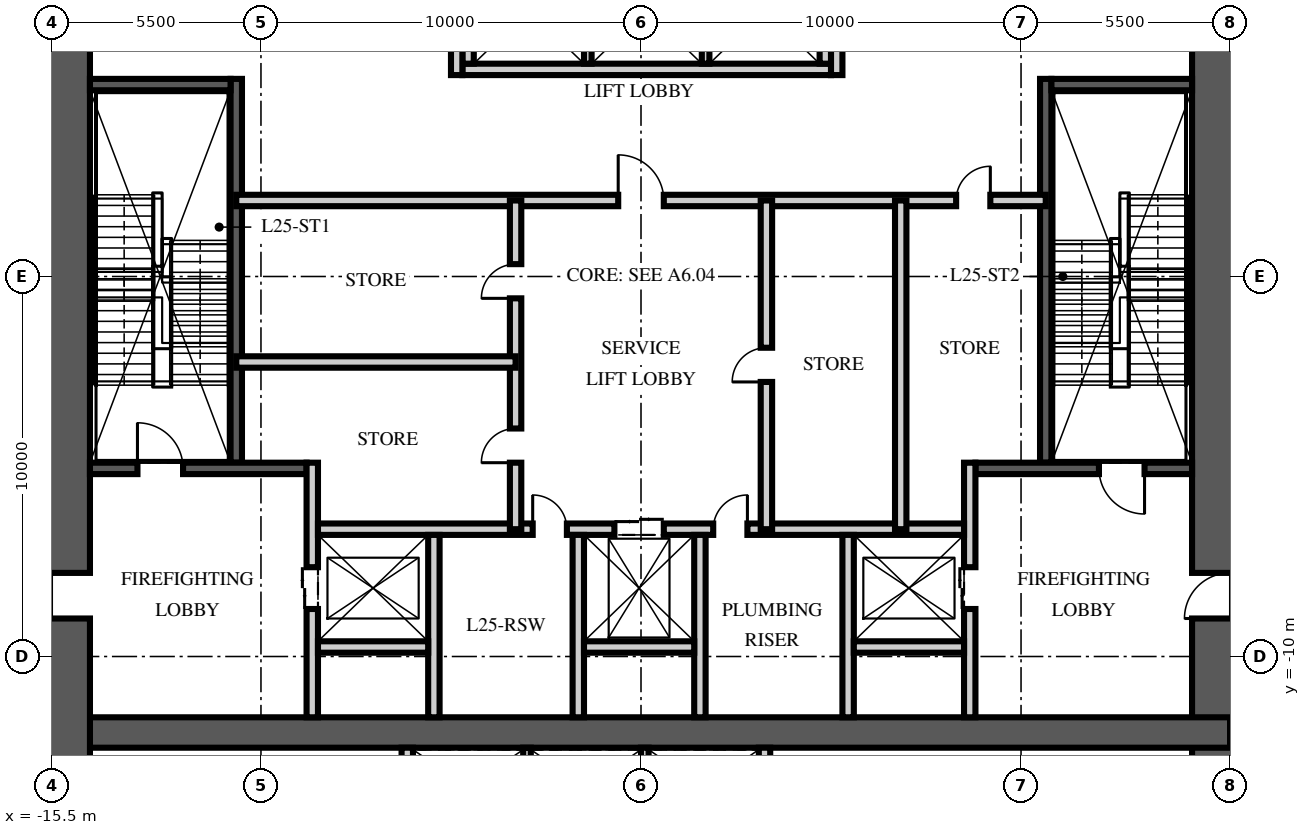
"""IFC4 building model, lengths in metres.
Left out: names, types, materials, properties, quantities, classifications, styles, units other than length and angle.
Written with IfcOpenShell. Run it as: python <this file> out.ifc"""

import sys

from ifc_helpers import new_model, si_unit, direction, frame, frame_2d, origin, place, context, subcontext, project, spatial, rectangle, extrude, element, fill, save


model = new_model("IFC4")
c1 = context("Model", 3, precision=1e-05, world=origin(), true_north=direction((0.0, 1.0)))
c2 = subcontext(c1, "Body", "Model", "MODEL_VIEW")
j1 = project(units=[si_unit("LENGTHUNIT", "METRE"), si_unit("PLANEANGLEUNIT", "RADIAN")], contexts=[c1])
p1 = place(None, origin())
s1 = spatial("IfcSite", under=j1, at=p1, CompositionType="ELEMENT")
p2 = place(p1, origin())
s2 = spatial("IfcBuilding", under=s1, at=p2, CompositionType="ELEMENT")
p3 = place(p2, frame((0.0, 0.0, 99.75)))
s3 = spatial("IfcBuildingStorey", under=s2, at=p3, CompositionType="ELEMENT", Elevation=99.75)
p4 = place(p3, frame((15.5, -15.5, -0.35), z_axis=(0.0, 0.0, 1.0), x_axis=(0.0, 1.0, 0.0)))
e1 = element("IfcWall", 1, at=p4, inside=s3, PredefinedType="SHEAR", context=c2, shape_type="SweptSolid", body=[
    extrude(rectangle(XDim=31.0, YDim=2.0, at=frame_2d((15.5, 0.0))), origin(), (0.0, 0.0, 1.0), 7.6),
])
p5 = place(p4, frame((6.5, 0.0, 0.35)))
e2 = element("IfcOpeningElement", 2, at=p5, cuts=e1, PredefinedType="OPENING", context=c2, shape_type="SweptSolid", body=[
    extrude(rectangle(XDim=1.2, YDim=2.1, at=frame_2d((0.6, 1.05))), frame((0.0, 1.01, 0.0), z_axis=(0.0, -1.0, 0.0), x_axis=(1.0, 0.0, 0.0)), (0.0, 0.0, 1.0), 2.02),
])
p6 = place(p4, frame((22.7, 0.0, 0.35)))
e3 = element("IfcOpeningElement", 3, at=p6, cuts=e1, PredefinedType="OPENING", context=c2, shape_type="SweptSolid", body=[
    extrude(rectangle(XDim=1.8, YDim=2.1, at=frame_2d((0.9, 1.05))), frame((0.0, 1.01, 0.0), z_axis=(0.0, -1.0, 0.0), x_axis=(1.0, 0.0, 0.0)), (0.0, 0.0, 1.0), 2.02),
])
p7 = place(p3, frame((-15.5, -12.0, -0.35), z_axis=(0.0, 0.0, 1.0), x_axis=(1.0, 0.0, 0.0)))
e4 = element("IfcWall", 4, at=p7, inside=s3, PredefinedType="SHEAR", context=c2, shape_type="SweptSolid", body=[
    extrude(rectangle(XDim=31.0, YDim=0.8, at=frame_2d((15.5, 0.0))), origin(), (0.0, 0.0, 1.0), 7.6),
])
p8 = place(p3, frame((-15.5, -15.5, -0.35), z_axis=(0.0, 0.0, 1.0), x_axis=(0.0, 1.0, 0.0)))
e5 = element("IfcWall", 5, at=p8, inside=s3, PredefinedType="SHEAR", context=c2, shape_type="SweptSolid", body=[
    extrude(rectangle(XDim=31.0, YDim=2.0, at=frame_2d((15.5, 0.0))), origin(), (0.0, 0.0, 1.0), 7.6),
])
p9 = place(p8, frame((6.5, 0.0, 0.35)))
e6 = element("IfcOpeningElement", 6, at=p9, cuts=e5, PredefinedType="OPENING", context=c2, shape_type="SweptSolid", body=[
    extrude(rectangle(XDim=1.2, YDim=2.1, at=frame_2d((0.6, 1.05))), frame((0.0, 1.01, 0.0), z_axis=(0.0, -1.0, 0.0), x_axis=(1.0, 0.0, 0.0)), (0.0, 0.0, 1.0), 2.02),
])
p10 = place(p8, frame((22.7, 0.0, 0.35)))
e7 = element("IfcOpeningElement", 7, at=p10, cuts=e5, PredefinedType="OPENING", context=c2, shape_type="SweptSolid", body=[
    extrude(rectangle(XDim=1.8, YDim=2.1, at=frame_2d((0.9, 1.05))), frame((0.0, 1.01, 0.0), z_axis=(0.0, -1.0, 0.0), x_axis=(1.0, 0.0, 0.0)), (0.0, 0.0, 1.0), 2.02),
])
p11 = place(p3, frame((-10.65, -4.9, 0.0), z_axis=(0.0, 0.0, 1.0), x_axis=(0.0, 1.0, 0.0)))
e8 = element("IfcWall", 8, at=p11, inside=s3, PredefinedType="SOLIDWALL", context=c2, shape_type="SweptSolid", body=[
    extrude(rectangle(XDim=10.1, YDim=0.3, at=frame_2d((5.05, 0.0))), origin(), (0.0, 0.0, 1.0), 7.25),
])
p12 = place(p3, frame((-14.5, -5.05, 0.0), z_axis=(0.0, 0.0, 1.0), x_axis=(1.0, 0.0, 0.0)))
e9 = element("IfcWall", 9, at=p12, inside=s3, PredefinedType="SOLIDWALL", context=c2, shape_type="SweptSolid", body=[
    extrude(rectangle(XDim=5.7, YDim=0.3, at=frame_2d((2.85, 0.0))), origin(), (0.0, 0.0, 1.0), 7.25),
])
p13 = place(p12, frame((1.25, 0.0, 0.0)))
e10 = element("IfcOpeningElement", 10, at=p13, cuts=e9, PredefinedType="OPENING", context=c2, shape_type="SweptSolid", body=[
    extrude(rectangle(XDim=1.2, YDim=2.1, at=frame_2d((0.6, 1.05))), frame((0.0, 0.16, 0.0), z_axis=(0.0, -1.0, 0.0), x_axis=(1.0, 0.0, 0.0)), (0.0, 0.0, 1.0), 0.32),
])
p14 = place(p3, frame((-14.5, 5.05, 0.0), z_axis=(0.0, 0.0, 1.0), x_axis=(1.0, 0.0, 0.0)))
e11 = element("IfcWall", 11, at=p14, inside=s3, PredefinedType="SOLIDWALL", context=c2, shape_type="SweptSolid", body=[
    extrude(rectangle(XDim=3.7, YDim=0.3, at=frame_2d((1.85, 0.0))), origin(), (0.0, 0.0, 1.0), 7.25),
])
p15 = place(p3, frame((-8.65, -11.6, 0.0), z_axis=(0.0, 0.0, 1.0), x_axis=(0.0, 1.0, 0.0)))
e12 = element("IfcWall", 12, at=p15, inside=s3, PredefinedType="PARTITIONING", context=c2, shape_type="SweptSolid", body=[
    extrude(rectangle(XDim=6.7, YDim=0.3, at=frame_2d((3.35, 0.0))), origin(), (0.0, 0.0, 1.0), 7.25),
])
p16 = place(p15, frame((2.85, 0.0, 0.0)))
e13 = element("IfcOpeningElement", 13, at=p16, cuts=e12, PredefinedType="OPENING", context=c2, shape_type="SweptSolid", body=[
    extrude(rectangle(XDim=1.1, YDim=2.1, at=frame_2d((0.55, 1.05))), frame((0.0, 0.16, 0.0), z_axis=(0.0, -1.0, 0.0), x_axis=(1.0, 0.0, 0.0)), (0.0, 0.0, 1.0), 0.32),
])
p17 = place(p3, frame((10.65, -4.9, 0.0), z_axis=(0.0, 0.0, 1.0), x_axis=(0.0, 1.0, 0.0)))
e14 = element("IfcWall", 14, at=p17, inside=s3, PredefinedType="SOLIDWALL", context=c2, shape_type="SweptSolid", body=[
    extrude(rectangle(XDim=10.1, YDim=0.3, at=frame_2d((5.05, 0.0))), origin(), (0.0, 0.0, 1.0), 7.25),
])
p18 = place(p3, frame((14.5, -5.05, 0.0), z_axis=(0.0, 0.0, 1.0), x_axis=(-1.0, 0.0, 0.0)))
e15 = element("IfcWall", 15, at=p18, inside=s3, PredefinedType="SOLIDWALL", context=c2, shape_type="SweptSolid", body=[
    extrude(rectangle(XDim=5.7, YDim=0.3, at=frame_2d((2.85, 0.0))), origin(), (0.0, 0.0, 1.0), 7.25),
])
p19 = place(p18, frame((1.25, 0.0, 0.0)))
e16 = element("IfcOpeningElement", 16, at=p19, cuts=e15, PredefinedType="OPENING", context=c2, shape_type="SweptSolid", body=[
    extrude(rectangle(XDim=1.2, YDim=2.1, at=frame_2d((0.6, 1.05))), frame((0.0, 0.16, 0.0), z_axis=(0.0, -1.0, 0.0), x_axis=(1.0, 0.0, 0.0)), (0.0, 0.0, 1.0), 0.32),
])
p20 = place(p3, frame((14.5, 5.05, 0.0), z_axis=(0.0, 0.0, 1.0), x_axis=(-1.0, 0.0, 0.0)))
e17 = element("IfcWall", 17, at=p20, inside=s3, PredefinedType="SOLIDWALL", context=c2, shape_type="SweptSolid", body=[
    extrude(rectangle(XDim=3.7, YDim=0.3, at=frame_2d((1.85, 0.0))), origin(), (0.0, 0.0, 1.0), 7.25),
])
p21 = place(p3, frame((8.65, -11.6, 0.0), z_axis=(0.0, 0.0, 1.0), x_axis=(0.0, 1.0, 0.0)))
e18 = element("IfcWall", 18, at=p21, inside=s3, PredefinedType="PARTITIONING", context=c2, shape_type="SweptSolid", body=[
    extrude(rectangle(XDim=6.7, YDim=0.3, at=frame_2d((3.35, 0.0))), origin(), (0.0, 0.0, 1.0), 7.25),
])
p22 = place(p21, frame((2.85, 0.0, 0.0)))
e19 = element("IfcOpeningElement", 19, at=p22, cuts=e18, PredefinedType="OPENING", context=c2, shape_type="SweptSolid", body=[
    extrude(rectangle(XDim=1.1, YDim=2.1, at=frame_2d((0.55, 1.05))), frame((0.0, 0.16, 0.0), z_axis=(0.0, -1.0, 0.0), x_axis=(1.0, 0.0, 0.0)), (0.0, 0.0, 1.0), 0.32),
])
p23 = place(p3, frame((-8.5, -6.65, 0.0), z_axis=(0.0, 0.0, 1.0), x_axis=(1.0, 0.0, 0.0)))
e20 = element("IfcWall", 20, at=p23, inside=s3, PredefinedType="PARTITIONING", context=c2, shape_type="SweptSolid", body=[
    extrude(rectangle(XDim=17.0, YDim=0.3, at=frame_2d((8.5, 0.0))), origin(), (0.0, 0.0, 1.0), 7.25),
])
p24 = place(p23, frame((7.8, 0.0, 0.0)))
e21 = element("IfcOpeningElement", 21, at=p24, cuts=e20, PredefinedType="OPENING", context=c2, shape_type="SweptSolid", body=[
    extrude(rectangle(XDim=1.3, YDim=2.4, at=frame_2d((0.65, 1.2))), frame((0.0, 0.16, 0.0), z_axis=(0.0, -1.0, 0.0), x_axis=(1.0, 0.0, 0.0)), (0.0, 0.0, 1.0), 0.32),
])
p25 = place(p23, frame((5.65, 0.0, 0.0)))
e22 = element("IfcOpeningElement", 22, at=p25, cuts=e20, PredefinedType="OPENING", context=c2, shape_type="SweptSolid", body=[
    extrude(rectangle(XDim=0.9, YDim=2.1, at=frame_2d((0.45, 1.05))), frame((0.0, 0.16, 0.0), z_axis=(0.0, -1.0, 0.0), x_axis=(1.0, 0.0, 0.0)), (0.0, 0.0, 1.0), 0.32),
])
p26 = place(p23, frame((10.4, 0.0, 0.0)))
e23 = element("IfcOpeningElement", 23, at=p26, cuts=e20, PredefinedType="OPENING", context=c2, shape_type="SweptSolid", body=[
    extrude(rectangle(XDim=0.9, YDim=2.1, at=frame_2d((0.45, 1.05))), frame((0.0, 0.16, 0.0), z_axis=(0.0, -1.0, 0.0), x_axis=(1.0, 0.0, 0.0)), (0.0, 0.0, 1.0), 0.32),
])
for number, where, z_axis, x_axis in (
    (24, (-5.45, -11.6, 0.0), (0.0, 0.0, 1.0), (0.0, 1.0, 0.0)),
    (25, (-1.65, -11.6, 0.0), (0.0, 0.0, 1.0), (0.0, 1.0, 0.0)),
    (26, (1.55, -11.6, 0.0), (0.0, 0.0, 1.0), (0.0, 1.0, 0.0)),
    (27, (5.45, -11.6, 0.0), (0.0, 0.0, 1.0), (0.0, 1.0, 0.0)),
):
    element("IfcWall", number, at=place(p3, frame(where, z_axis=z_axis, x_axis=x_axis)), inside=s3, PredefinedType="PARTITIONING", context=c2, shape_type="SweptSolid", body=[
        extrude(rectangle(XDim=4.8, YDim=0.3, at=frame_2d((2.4, 0.0))), origin(), (0.0, 0.0, 1.0), 7.25),
    ])
for number, where, z_axis, x_axis in (
    (28, (-8.5, -9.75, 0.0), (0.0, 0.0, 1.0), (1.0, 0.0, 0.0)),
    (29, (-1.5, -9.75, 0.0), (0.0, 0.0, 1.0), (1.0, 0.0, 0.0)),
    (30, (5.6, -9.75, 0.0), (0.0, 0.0, 1.0), (1.0, 0.0, 0.0)),
):
    element("IfcWall", number, at=place(p3, frame(where, z_axis=z_axis, x_axis=x_axis)), inside=s3, PredefinedType="PARTITIONING", context=c2, shape_type="SweptSolid", body=[
        extrude(rectangle(XDim=2.9, YDim=0.3, at=frame_2d((1.45, 0.0))), origin(), (0.0, 0.0, 1.0), 7.25),
    ])
p27 = place(p3, frame((-4.7, 5.45, 0.0), z_axis=(0.0, 0.0, 1.0), x_axis=(1.0, 0.0, 0.0)))
e31 = element("IfcWall", 31, at=p27, inside=s3, PredefinedType="PARTITIONING", context=c2, shape_type="SweptSolid", body=[
    extrude(rectangle(XDim=9.7, YDim=0.3, at=frame_2d((4.85, 0.0))), origin(), (0.0, 0.0, 1.0), 7.25),
])
for number, where, z_axis, x_axis in (
    (32, (-4.55, 5.6, 0.0), (0.0, 0.0, 1.0), (0.0, 1.0, 0.0)),
    (33, (4.85, 5.6, 0.0), (0.0, 0.0, 1.0), (0.0, 1.0, 0.0)),
):
    element("IfcWall", number, at=place(p3, frame(where, z_axis=z_axis, x_axis=x_axis)), inside=s3, PredefinedType="PARTITIONING", context=c2, shape_type="SweptSolid", body=[
        extrude(rectangle(XDim=2.8, YDim=0.3, at=frame_2d((1.4, 0.0))), origin(), (0.0, 0.0, 1.0), 7.25),
    ])
for number, where, z_axis, x_axis in (
    (34, (-1.4, 5.6, 0.0), (0.0, 0.0, 1.0), (0.0, 1.0, 0.0)),
    (35, (1.7, 5.6, 0.0), (0.0, 0.0, 1.0), (0.0, 1.0, 0.0)),
):
    element("IfcWall", number, at=place(p3, frame(where, z_axis=z_axis, x_axis=x_axis)), inside=s3, PredefinedType="PARTITIONING", context=c2, shape_type="SweptSolid", body=[
        extrude(rectangle(XDim=2.8, YDim=0.2, at=frame_2d((1.4, 0.0))), origin(), (0.0, 0.0, 1.0), 7.25),
    ])
for number, where, z_axis, x_axis in (
    (36, (-6.15, -14.5, 0.0), (0.0, 0.0, 1.0), (0.0, 1.0, 0.0)),
    (37, (3.25, -14.5, 0.0), (0.0, 0.0, 1.0), (0.0, 1.0, 0.0)),
):
    element("IfcWall", number, at=place(p3, frame(where, z_axis=z_axis, x_axis=x_axis)), inside=s3, PredefinedType="PARTITIONING", context=c2, shape_type="SweptSolid", body=[
        extrude(rectangle(XDim=2.1, YDim=0.3, at=frame_2d((1.05, 0.0))), origin(), (0.0, 0.0, 1.0), 7.25),
    ])
for number, where, z_axis, x_axis in (
    (38, (-3.0, -14.5, 0.0), (0.0, 0.0, 1.0), (0.0, 1.0, 0.0)),
    (39, (0.1, -14.5, 0.0), (0.0, 0.0, 1.0), (0.0, 1.0, 0.0)),
):
    element("IfcWall", number, at=place(p3, frame(where, z_axis=z_axis, x_axis=x_axis)), inside=s3, PredefinedType="PARTITIONING", context=c2, shape_type="SweptSolid", body=[
        extrude(rectangle(XDim=2.1, YDim=0.2, at=frame_2d((1.05, 0.0))), origin(), (0.0, 0.0, 1.0), 7.25),
    ])
p28 = place(p3, frame((-10.65, 2.0, 0.0), z_axis=(0.0, 0.0, 1.0), x_axis=(1.0, 0.0, 0.0)))
e40 = element("IfcWall", 40, at=p28, inside=s3, PredefinedType="PARTITIONING", context=c2, shape_type="SweptSolid", body=[
    extrude(rectangle(XDim=21.3, YDim=0.3, at=frame_2d((10.65, 0.0))), origin(), (0.0, 0.0, 1.0), 7.25),
])
p29 = place(p28, frame((10.05, 0.0, 0.0)))
e41 = element("IfcOpeningElement", 41, at=p29, cuts=e40, PredefinedType="OPENING", context=c2, shape_type="SweptSolid", body=[
    extrude(rectangle(XDim=1.2, YDim=2.1, at=frame_2d((0.6, 1.05))), frame((0.0, 0.16, 0.0), z_axis=(0.0, -1.0, 0.0), x_axis=(1.0, 0.0, 0.0)), (0.0, 0.0, 1.0), 0.32),
])
p30 = place(p28, frame((18.942, 0.0, 0.0)))
e42 = element("IfcOpeningElement", 42, at=p30, cuts=e40, PredefinedType="OPENING", context=c2, shape_type="SweptSolid", body=[
    extrude(rectangle(XDim=0.9, YDim=2.1, at=frame_2d((0.45, 1.05))), frame((0.0, 0.16, 0.0), z_axis=(0.0, -1.0, 0.0), x_axis=(1.0, 0.0, 0.0)), (0.0, 0.0, 1.0), 0.32),
])
p31 = place(p3, frame((-3.3, -6.65, 0.0), z_axis=(0.0, 0.0, 1.0), x_axis=(0.0, 1.0, 0.0)))
e43 = element("IfcWall", 43, at=p31, inside=s3, PredefinedType="PARTITIONING", context=c2, shape_type="SweptSolid", body=[
    extrude(rectangle(XDim=8.65, YDim=0.3, at=frame_2d((4.325, 0.0))), origin(), (0.0, 0.0, 1.0), 7.25),
])
p32 = place(p31, frame((1.75, 0.0, 0.0)))
e44 = element("IfcOpeningElement", 44, at=p32, cuts=e43, PredefinedType="OPENING", context=c2, shape_type="SweptSolid", body=[
    extrude(rectangle(XDim=0.9, YDim=2.1, at=frame_2d((0.45, 1.05))), frame((0.0, 0.16, 0.0), z_axis=(0.0, -1.0, 0.0), x_axis=(1.0, 0.0, 0.0)), (0.0, 0.0, 1.0), 0.32),
])
p33 = place(p31, frame((6.075, 0.0, 0.0)))
e45 = element("IfcOpeningElement", 45, at=p33, cuts=e43, PredefinedType="OPENING", context=c2, shape_type="SweptSolid", body=[
    extrude(rectangle(XDim=0.9, YDim=2.1, at=frame_2d((0.45, 1.05))), frame((0.0, 0.16, 0.0), z_axis=(0.0, -1.0, 0.0), x_axis=(1.0, 0.0, 0.0)), (0.0, 0.0, 1.0), 0.32),
])
p34 = place(p3, frame((3.3, -6.65, 0.0), z_axis=(0.0, 0.0, 1.0), x_axis=(0.0, 1.0, 0.0)))
e46 = element("IfcWall", 46, at=p34, inside=s3, PredefinedType="PARTITIONING", context=c2, shape_type="SweptSolid", body=[
    extrude(rectangle(XDim=8.65, YDim=0.3, at=frame_2d((4.325, 0.0))), origin(), (0.0, 0.0, 1.0), 7.25),
])
p35 = place(p34, frame((3.875, 0.0, 0.0)))
e47 = element("IfcOpeningElement", 47, at=p35, cuts=e46, PredefinedType="OPENING", context=c2, shape_type="SweptSolid", body=[
    extrude(rectangle(XDim=0.9, YDim=2.1, at=frame_2d((0.45, 1.05))), frame((0.0, 0.16, 0.0), z_axis=(0.0, -1.0, 0.0), x_axis=(1.0, 0.0, 0.0)), (0.0, 0.0, 1.0), 0.32),
])
p36 = place(p3, frame((-10.65, -2.25, 0.0), z_axis=(0.0, 0.0, 1.0), x_axis=(1.0, 0.0, 0.0)))
e48 = element("IfcWall", 48, at=p36, inside=s3, PredefinedType="PARTITIONING", context=c2, shape_type="SweptSolid", body=[
    extrude(rectangle(XDim=7.35, YDim=0.3, at=frame_2d((3.675, 0.0))), origin(), (0.0, 0.0, 1.0), 7.25),
])
p37 = place(p3, frame((6.834, -6.65, 0.0), z_axis=(0.0, 0.0, 1.0), x_axis=(0.0, 1.0, 0.0)))
e49 = element("IfcWall", 49, at=p37, inside=s3, PredefinedType="PARTITIONING", context=c2, shape_type="SweptSolid", body=[
    extrude(rectangle(XDim=8.65, YDim=0.3, at=frame_2d((4.325, 0.0))), origin(), (0.0, 0.0, 1.0), 7.25),
])
p38 = place(p3, frame((-4.85, 5.3, 0.0), z_axis=(0.0, 0.0, 1.0), x_axis=(0.0, 1.0, 0.0)))
e50 = element("IfcWall", 50, at=p38, inside=s3, PredefinedType="PARTITIONING", context=c2, shape_type="SweptSolid", body=[
    extrude(rectangle(XDim=6.3, YDim=0.3, at=frame_2d((3.15, 0.0))), origin(), (0.0, 0.0, 1.0), 7.25),
])
p39 = place(p3, frame((5.15, 5.3, 0.0), z_axis=(0.0, 0.0, 1.0), x_axis=(0.0, 1.0, 0.0)))
e51 = element("IfcWall", 51, at=p39, inside=s3, PredefinedType="PARTITIONING", context=c2, shape_type="SweptSolid", body=[
    extrude(rectangle(XDim=6.3, YDim=0.3, at=frame_2d((3.15, 0.0))), origin(), (0.0, 0.0, 1.0), 7.25),
])
p40 = place(p39, frame((4.35, 0.0, 0.0)))
e52 = element("IfcOpeningElement", 52, at=p40, cuts=e51, PredefinedType="OPENING", context=c2, shape_type="SweptSolid", body=[
    extrude(rectangle(XDim=0.9, YDim=2.1, at=frame_2d((0.45, 1.05))), frame((0.0, 0.16, 0.0), z_axis=(0.0, -1.0, 0.0), x_axis=(1.0, 0.0, 0.0)), (0.0, 0.0, 1.0), 0.32),
])
p41 = place(p13, origin())
e53 = element("IfcDoor", 53, at=p41, inside=s3, OperationType="SINGLE_SWING_LEFT", PredefinedType="DOOR", context=c2, shape_type="SweptSolid", body=[
    extrude(rectangle(XDim=1.2, YDim=2.1, at=frame_2d((0.6, 1.05))), frame((0.0, 0.025, 0.0), z_axis=(0.0, -1.0, 0.0), x_axis=(1.0, 0.0, 0.0)), (0.0, 0.0, 1.0), 0.05),
])
fill(e10, e53)
p42 = place(p9, origin())
e54 = element("IfcDoor", 54, at=p42, inside=s3, OperationType="SINGLE_SWING_LEFT", PredefinedType="DOOR", context=c2, shape_type="SweptSolid", body=[
    extrude(rectangle(XDim=1.2, YDim=2.1, at=frame_2d((0.6, 1.05))), frame((0.0, 0.025, 0.0), z_axis=(0.0, -1.0, 0.0), x_axis=(1.0, 0.0, 0.0)), (0.0, 0.0, 1.0), 0.05),
])
fill(e6, e54)
p43 = place(p19, origin())
e55 = element("IfcDoor", 55, at=p43, inside=s3, OperationType="SINGLE_SWING_LEFT", PredefinedType="DOOR", context=c2, shape_type="SweptSolid", body=[
    extrude(rectangle(XDim=1.2, YDim=2.1, at=frame_2d((0.6, 1.05))), frame((0.0, 0.025, 0.0), z_axis=(0.0, -1.0, 0.0), x_axis=(1.0, 0.0, 0.0)), (0.0, 0.0, 1.0), 0.05),
])
fill(e16, e55)
p44 = place(p5, origin())
e56 = element("IfcDoor", 56, at=p44, inside=s3, OperationType="SINGLE_SWING_LEFT", PredefinedType="DOOR", context=c2, shape_type="SweptSolid", body=[
    extrude(rectangle(XDim=1.2, YDim=2.1, at=frame_2d((0.6, 1.05))), frame((0.0, 0.025, 0.0), z_axis=(0.0, -1.0, 0.0), x_axis=(1.0, 0.0, 0.0)), (0.0, 0.0, 1.0), 0.05),
])
fill(e2, e56)
p45 = place(p16, origin())
e57 = element("IfcDoor", 57, at=p45, inside=s3, OperationType="DOUBLE_DOOR_SLIDING", PredefinedType="DOOR", context=c2, shape_type="SweptSolid", body=[
    extrude(rectangle(XDim=1.1, YDim=2.1, at=frame_2d((0.55, 1.05))), frame((0.0, 0.025, 0.0), z_axis=(0.0, -1.0, 0.0), x_axis=(1.0, 0.0, 0.0)), (0.0, 0.0, 1.0), 0.05),
])
fill(e13, e57)
p46 = place(p22, origin())
e58 = element("IfcDoor", 58, at=p46, inside=s3, OperationType="DOUBLE_DOOR_SLIDING", PredefinedType="DOOR", context=c2, shape_type="SweptSolid", body=[
    extrude(rectangle(XDim=1.1, YDim=2.1, at=frame_2d((0.55, 1.05))), frame((0.0, 0.025, 0.0), z_axis=(0.0, -1.0, 0.0), x_axis=(1.0, 0.0, 0.0)), (0.0, 0.0, 1.0), 0.05),
])
fill(e19, e58)
p47 = place(p24, origin())
e59 = element("IfcDoor", 59, at=p47, inside=s3, OperationType="DOUBLE_DOOR_SLIDING", PredefinedType="DOOR", context=c2, shape_type="SweptSolid", body=[
    extrude(rectangle(XDim=1.3, YDim=2.4, at=frame_2d((0.65, 1.2))), frame((0.0, 0.025, 0.0), z_axis=(0.0, -1.0, 0.0), x_axis=(1.0, 0.0, 0.0)), (0.0, 0.0, 1.0), 0.05),
])
fill(e21, e59)
p48 = place(p29, origin())
e60 = element("IfcDoor", 60, at=p48, inside=s3, OperationType="SINGLE_SWING_LEFT", PredefinedType="DOOR", context=c2, shape_type="SweptSolid", body=[
    extrude(rectangle(XDim=1.2, YDim=2.1, at=frame_2d((0.6, 1.05))), frame((0.0, 0.025, 0.0), z_axis=(0.0, -1.0, 0.0), x_axis=(1.0, 0.0, 0.0)), (0.0, 0.0, 1.0), 0.05),
])
fill(e41, e60)
p49 = place(p25, origin())
e61 = element("IfcDoor", 61, at=p49, inside=s3, OperationType="SINGLE_SWING_LEFT", PredefinedType="DOOR", context=c2, shape_type="SweptSolid", body=[
    extrude(rectangle(XDim=0.9, YDim=2.1, at=frame_2d((0.45, 1.05))), frame((0.0, 0.025, 0.0), z_axis=(0.0, -1.0, 0.0), x_axis=(1.0, 0.0, 0.0)), (0.0, 0.0, 1.0), 0.05),
])
fill(e22, e61)
p50 = place(p26, origin())
e62 = element("IfcDoor", 62, at=p50, inside=s3, OperationType="SINGLE_SWING_RIGHT", PredefinedType="DOOR", context=c2, shape_type="SweptSolid", body=[
    extrude(rectangle(XDim=0.9, YDim=2.1, at=frame_2d((0.45, 1.05))), frame((0.0, 0.025, 0.0), z_axis=(0.0, -1.0, 0.0), x_axis=(1.0, 0.0, 0.0)), (0.0, 0.0, 1.0), 0.05),
])
fill(e23, e62)
p51 = place(p32, origin())
e63 = element("IfcDoor", 63, at=p51, inside=s3, OperationType="SINGLE_SWING_LEFT", PredefinedType="DOOR", context=c2, shape_type="SweptSolid", body=[
    extrude(rectangle(XDim=0.9, YDim=2.1, at=frame_2d((0.45, 1.05))), frame((0.0, 0.025, 0.0), z_axis=(0.0, -1.0, 0.0), x_axis=(1.0, 0.0, 0.0)), (0.0, 0.0, 1.0), 0.05),
])
fill(e44, e63)
p52 = place(p33, origin())
e64 = element("IfcDoor", 64, at=p52, inside=s3, OperationType="SINGLE_SWING_LEFT", PredefinedType="DOOR", context=c2, shape_type="SweptSolid", body=[
    extrude(rectangle(XDim=0.9, YDim=2.1, at=frame_2d((0.45, 1.05))), frame((0.0, 0.025, 0.0), z_axis=(0.0, -1.0, 0.0), x_axis=(1.0, 0.0, 0.0)), (0.0, 0.0, 1.0), 0.05),
])
fill(e45, e64)
p53 = place(p35, origin())
e65 = element("IfcDoor", 65, at=p53, inside=s3, OperationType="SINGLE_SWING_LEFT", PredefinedType="DOOR", context=c2, shape_type="SweptSolid", body=[
    extrude(rectangle(XDim=0.9, YDim=2.1, at=frame_2d((0.45, 1.05))), frame((0.0, 0.025, 0.0), z_axis=(0.0, -1.0, 0.0), x_axis=(1.0, 0.0, 0.0)), (0.0, 0.0, 1.0), 0.05),
])
fill(e47, e65)
p54 = place(p30, origin())
e66 = element("IfcDoor", 66, at=p54, inside=s3, OperationType="SINGLE_SWING_RIGHT", PredefinedType="DOOR", context=c2, shape_type="SweptSolid", body=[
    extrude(rectangle(XDim=0.9, YDim=2.1, at=frame_2d((0.45, 1.05))), frame((0.0, 0.025, 0.0), z_axis=(0.0, -1.0, 0.0), x_axis=(1.0, 0.0, 0.0)), (0.0, 0.0, 1.0), 0.05),
])
fill(e42, e66)
save(model, sys.argv[1])
